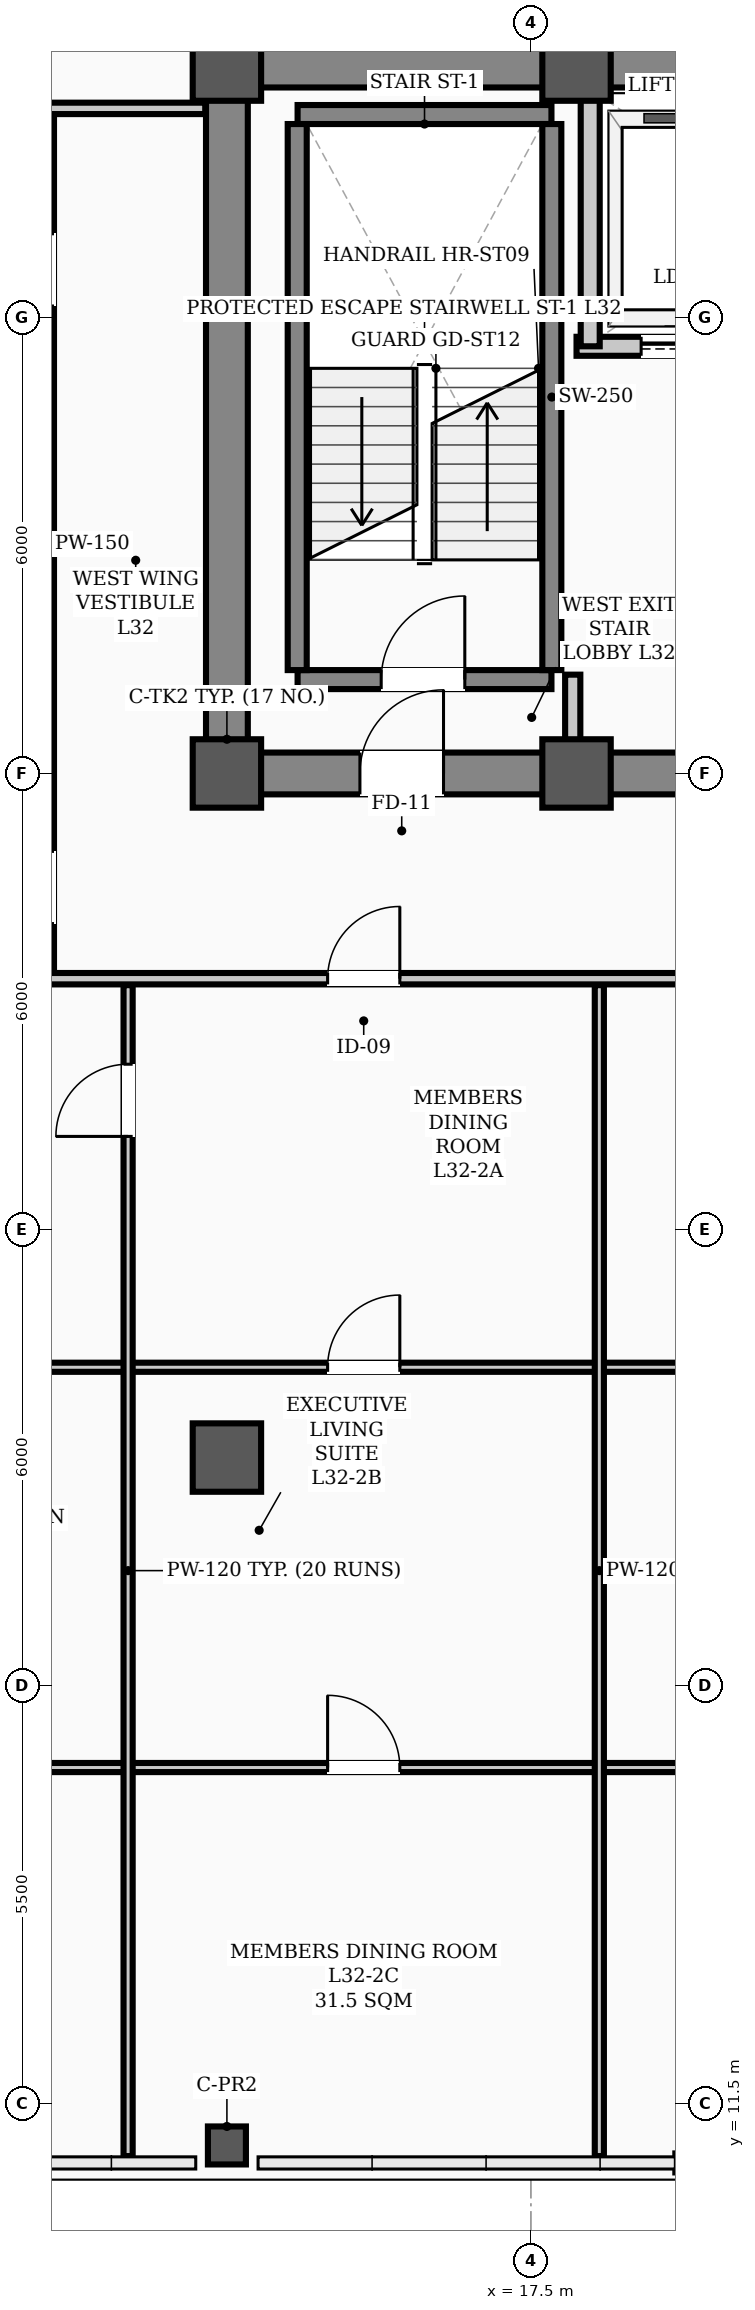
"""IFC4 building model, lengths in metres.
Left out: names, types, materials, properties, quantities, classifications, styles, units other than length and angle.
Written with IfcOpenShell. Run it as: python <this file> out.ifc"""

import sys

from ifc_helpers import new_model, si_unit, direction, frame, frame_2d, origin, origin_2d, place, context, subcontext, project, spatial, rectangle, hollow_rectangle, extrude, element, fill, save


model = new_model("IFC4")
c1 = context("Model", 3, precision=1e-05, world=origin(), true_north=direction((0.0, 1.0)))
c2 = subcontext(c1, "Body", "Model", "MODEL_VIEW")
j1 = project(units=[si_unit("LENGTHUNIT", "METRE"), si_unit("PLANEANGLEUNIT", "RADIAN")], contexts=[c1])
p1 = place(None, origin())
s1 = spatial("IfcSite", under=j1, at=p1, CompositionType="ELEMENT")
p2 = place(p1, origin())
s2 = spatial("IfcBuilding", under=s1, at=p2, CompositionType="ELEMENT")
p3 = place(p2, frame((0.0, 0.0, 130.5)))
s3 = spatial("IfcBuildingStorey", under=s2, at=p3, CompositionType="ELEMENT", Elevation=130.5)
for number, where, z_axis, x_axis in (
    (1, (13.5, 29.0, 0.0), (0.0, 0.0, 1.0), (1.0, 0.0, 0.0)),
    (2, (13.5, 38.3, 0.0), (0.0, 0.0, 1.0), (1.0, 0.0, 0.0)),
    (3, (18.1, 29.0, 0.0), (0.0, 0.0, 1.0), (1.0, 0.0, 0.0)),
    (4, (18.1, 38.3, 0.0), (0.0, 0.0, 1.0), (1.0, 0.0, 0.0)),
    (5, (13.5, 20.0, 0.0), (0.0, 0.0, 1.0), (1.0, 0.0, 0.0)),
):
    element("IfcColumn", number, at=place(p3, frame(where, z_axis=z_axis, x_axis=x_axis)), inside=s3, PredefinedType="COLUMN", context=c2, shape_type="SweptSolid", body=[
        extrude(hollow_rectangle(XDim=0.9, YDim=0.9, WallThickness=0.035, InnerFilletRadius=0.017, OuterFilletRadius=0.052, at=origin_2d()), origin(), (0.0, 0.0, 1.0), 3.9),
    ])
p4 = place(p3, frame((13.5, 10.95, 0.0), z_axis=(0.0, 0.0, 1.0), x_axis=(1.0, 0.0, 0.0)))
e6 = element("IfcColumn", 6, at=p4, inside=s3, PredefinedType="COLUMN", context=c2, shape_type="SweptSolid", body=[
    extrude(hollow_rectangle(XDim=0.5, YDim=0.5, WallThickness=0.024, InnerFilletRadius=0.012, OuterFilletRadius=0.036, at=origin_2d()), origin(), (0.0, 0.0, 1.0), 3.9),
])
p5 = place(p3, frame((13.5, 29.0, 0.0), z_axis=(0.0, 0.0, 1.0), x_axis=(1.0, 0.0, 0.0)))
e7 = element("IfcWall", 7, at=p5, inside=s3, PredefinedType="SHEAR", context=c2, shape_type="SweptSolid", body=[
    extrude(rectangle(XDim=30.5, YDim=0.55, at=frame_2d((15.25, 0.0))), origin(), (0.0, 0.0, 1.0), 3.72),
])
p6 = place(p5, frame((1.75, 0.0, 0.0)))
e8 = element("IfcOpeningElement", 8, at=p6, cuts=e7, PredefinedType="OPENING", context=c2, shape_type="SweptSolid", body=[
    extrude(rectangle(XDim=1.1, YDim=2.08, at=frame_2d((0.55, 1.04))), frame((0.0, 0.285, 0.0), z_axis=(0.0, -1.0, 0.0), x_axis=(1.0, 0.0, 0.0)), (0.0, 0.0, 1.0), 0.57),
])
p7 = place(p5, frame((26.7, 0.0, 0.0)))
e9 = element("IfcOpeningElement", 9, at=p7, cuts=e7, PredefinedType="OPENING", context=c2, shape_type="SweptSolid", body=[
    extrude(rectangle(XDim=1.1, YDim=2.08, at=frame_2d((0.55, 1.04))), frame((0.0, 0.285, 0.0), z_axis=(0.0, -1.0, 0.0), x_axis=(1.0, 0.0, 0.0)), (0.0, 0.0, 1.0), 0.57),
])
p8 = place(p5, frame((6.8, 0.0, 0.0)))
e10 = element("IfcOpeningElement", 10, at=p8, cuts=e7, PredefinedType="OPENING", context=c2, shape_type="SweptSolid", body=[
    extrude(rectangle(XDim=1.1, YDim=2.08, at=frame_2d((0.55, 1.04))), frame((0.0, 0.285, 0.0), z_axis=(0.0, -1.0, 0.0), x_axis=(1.0, 0.0, 0.0)), (0.0, 0.0, 1.0), 0.57),
])
p9 = place(p5, frame((13.2, 0.0, 0.0)))
e11 = element("IfcOpeningElement", 11, at=p9, cuts=e7, PredefinedType="OPENING", context=c2, shape_type="SweptSolid", body=[
    extrude(rectangle(XDim=1.6, YDim=2.08, at=frame_2d((0.8, 1.04))), frame((0.0, 0.285, 0.0), z_axis=(0.0, -1.0, 0.0), x_axis=(1.0, 0.0, 0.0)), (0.0, 0.0, 1.0), 0.57),
])
p10 = place(p5, frame((19.53, 0.0, 0.0)))
e12 = element("IfcOpeningElement", 12, at=p10, cuts=e7, PredefinedType="OPENING", context=c2, shape_type="SweptSolid", body=[
    extrude(rectangle(XDim=0.9, YDim=2.08, at=frame_2d((0.45, 1.04))), frame((0.0, 0.285, 0.0), z_axis=(0.0, -1.0, 0.0), x_axis=(1.0, 0.0, 0.0)), (0.0, 0.0, 1.0), 0.57),
])
p11 = place(p5, frame((21.57, 0.0, 0.0)))
e13 = element("IfcOpeningElement", 13, at=p11, cuts=e7, PredefinedType="OPENING", context=c2, shape_type="SweptSolid", body=[
    extrude(rectangle(XDim=0.9, YDim=2.08, at=frame_2d((0.45, 1.04))), frame((0.0, 0.285, 0.0), z_axis=(0.0, -1.0, 0.0), x_axis=(1.0, 0.0, 0.0)), (0.0, 0.0, 1.0), 0.57),
])
p12 = place(p3, frame((13.5, 38.3, 0.0), z_axis=(0.0, 0.0, 1.0), x_axis=(1.0, 0.0, 0.0)))
e14 = element("IfcWall", 14, at=p12, inside=s3, PredefinedType="SHEAR", context=c2, shape_type="SweptSolid", body=[
    extrude(rectangle(XDim=30.5, YDim=0.55, at=frame_2d((15.25, 0.0))), origin(), (0.0, 0.0, 1.0), 3.72),
])
p13 = place(p3, frame((13.5, 29.35, 0.0), z_axis=(0.0, 0.0, 1.0), x_axis=(0.0, 1.0, 0.0)))
e15 = element("IfcWall", 15, at=p13, inside=s3, PredefinedType="SHEAR", context=c2, shape_type="SweptSolid", body=[
    extrude(rectangle(XDim=8.6, YDim=0.55, at=frame_2d((4.3, 0.0))), origin(), (0.0, 0.0, 1.0), 3.72),
])
p14 = place(p3, frame((14.43, 30.235, 0.0), z_axis=(0.0, 0.0, 1.0), x_axis=(1.0, 0.0, 0.0)))
e16 = element("IfcWall", 16, at=p14, inside=s3, PredefinedType="STANDARD", context=c2, shape_type="SweptSolid", body=[
    extrude(rectangle(XDim=3.34, YDim=0.25, at=frame_2d((1.67, 0.0))), origin(), (0.0, 0.0, 1.0), 3.72),
])
p15 = place(p14, frame((1.1, 0.0, 0.0)))
e17 = element("IfcOpeningElement", 17, at=p15, cuts=e16, PredefinedType="OPENING", context=c2, shape_type="SweptSolid", body=[
    extrude(rectangle(XDim=1.1, YDim=2.08, at=frame_2d((0.55, 1.04))), frame((0.0, 0.135, 0.0), z_axis=(0.0, -1.0, 0.0), x_axis=(1.0, 0.0, 0.0)), (0.0, 0.0, 1.0), 0.27),
])
p16 = place(p3, frame((14.43, 37.669, 0.0), z_axis=(0.0, 0.0, 1.0), x_axis=(1.0, 0.0, 0.0)))
e18 = element("IfcWall", 18, at=p16, inside=s3, PredefinedType="STANDARD", context=c2, shape_type="SweptSolid", body=[
    extrude(rectangle(XDim=3.34, YDim=0.25, at=frame_2d((1.67, 0.0))), origin(), (0.0, 0.0, 1.0), 3.72),
])
for number, where, z_axis, x_axis in (
    (19, (14.425, 30.36, 0.0), (0.0, 0.0, 1.0), (0.0, 1.0, 0.0)),
    (20, (17.775, 30.36, 0.0), (0.0, 0.0, 1.0), (0.0, 1.0, 0.0)),
):
    element("IfcWall", number, at=place(p3, frame(where, z_axis=z_axis, x_axis=x_axis)), inside=s3, PredefinedType="STANDARD", context=c2, shape_type="SweptSolid", body=[
        extrude(rectangle(XDim=7.184, YDim=0.25, at=frame_2d((3.592, 0.0))), origin(), (0.0, 0.0, 1.0), 3.72),
    ])
p17 = place(p3, frame((18.1, 34.62, 0.0), z_axis=(0.0, 0.0, 1.0), x_axis=(1.0, 0.0, 0.0)))
e21 = element("IfcWall", 21, at=p17, inside=s3, PredefinedType="STANDARD", context=c2, shape_type="SweptSolid", body=[
    extrude(rectangle(XDim=5.35, YDim=0.25, at=frame_2d((2.675, 0.0))), origin(), (0.0, 0.0, 1.0), 3.72),
])
p18 = place(p17, frame((0.85, 0.0, 0.0)))
e22 = element("IfcOpeningElement", 22, at=p18, cuts=e21, PredefinedType="OPENING", context=c2, shape_type="SweptSolid", body=[
    extrude(rectangle(XDim=1.1, YDim=2.08, at=frame_2d((0.55, 1.04))), frame((0.0, 0.135, 0.0), z_axis=(0.0, -1.0, 0.0), x_axis=(1.0, 0.0, 0.0)), (0.0, 0.0, 1.0), 0.27),
])
p19 = place(p17, frame((3.45, 0.0, 0.0)))
e23 = element("IfcOpeningElement", 23, at=p19, cuts=e21, PredefinedType="OPENING", context=c2, shape_type="SweptSolid", body=[
    extrude(rectangle(XDim=1.1, YDim=2.08, at=frame_2d((0.55, 1.04))), frame((0.0, 0.135, 0.0), z_axis=(0.0, -1.0, 0.0), x_axis=(1.0, 0.0, 0.0)), (0.0, 0.0, 1.0), 0.27),
])
p20 = place(p3, frame((18.28, 34.62, 0.0), z_axis=(0.0, 0.0, 1.0), x_axis=(0.0, 1.0, 0.0)))
e24 = element("IfcWall", 24, at=p20, inside=s3, PredefinedType="STANDARD", context=c2, shape_type="SweptSolid", body=[
    extrude(rectangle(XDim=3.33, YDim=0.25, at=frame_2d((1.665, 0.0))), origin(), (0.0, 0.0, 1.0), 3.72),
])
p21 = place(p3, frame((2.31, 26.3, 0.0), z_axis=(0.0, 0.0, 1.0), x_axis=(1.0, 0.0, 0.0)))
e25 = element("IfcWall", 25, at=p21, inside=s3, PredefinedType="PARTITIONING", context=c2, shape_type="SweptSolid", body=[
    extrude(rectangle(XDim=46.38, YDim=0.15, at=frame_2d((23.19, 0.0))), origin(), (0.0, 0.0, 1.0), 3.1),
])
p22 = place(p21, frame((12.515, 0.0, 0.0)))
e26 = element("IfcOpeningElement", 26, at=p22, cuts=e25, PredefinedType="OPENING", context=c2, shape_type="SweptSolid", body=[
    extrude(rectangle(XDim=0.95, YDim=2.08, at=frame_2d((0.475, 1.04))), frame((0.0, 0.085, 0.0), z_axis=(0.0, -1.0, 0.0), x_axis=(1.0, 0.0, 0.0)), (0.0, 0.0, 1.0), 0.17),
])
p23 = place(p21, frame((18.615, 0.0, 0.0)))
e27 = element("IfcOpeningElement", 27, at=p23, cuts=e25, PredefinedType="OPENING", context=c2, shape_type="SweptSolid", body=[
    extrude(rectangle(XDim=0.95, YDim=2.08, at=frame_2d((0.475, 1.04))), frame((0.0, 0.085, 0.0), z_axis=(0.0, -1.0, 0.0), x_axis=(1.0, 0.0, 0.0)), (0.0, 0.0, 1.0), 0.17),
])
p24 = place(p21, frame((26.115, 0.0, 0.0)))
e28 = element("IfcOpeningElement", 28, at=p24, cuts=e25, PredefinedType="OPENING", context=c2, shape_type="SweptSolid", body=[
    extrude(rectangle(XDim=0.95, YDim=2.08, at=frame_2d((0.475, 1.04))), frame((0.0, 0.085, 0.0), z_axis=(0.0, -1.0, 0.0), x_axis=(1.0, 0.0, 0.0)), (0.0, 0.0, 1.0), 0.17),
])
p25 = place(p21, frame((31.665, 0.0, 0.0)))
e29 = element("IfcOpeningElement", 29, at=p25, cuts=e25, PredefinedType="OPENING", context=c2, shape_type="SweptSolid", body=[
    extrude(rectangle(XDim=0.95, YDim=2.08, at=frame_2d((0.475, 1.04))), frame((0.0, 0.085, 0.0), z_axis=(0.0, -1.0, 0.0), x_axis=(1.0, 0.0, 0.0)), (0.0, 0.0, 1.0), 0.17),
])
p26 = place(p21, frame((43.06, 0.0, 0.0)))
e30 = element("IfcOpeningElement", 30, at=p26, cuts=e25, PredefinedType="OPENING", context=c2, shape_type="SweptSolid", body=[
    extrude(rectangle(XDim=0.95, YDim=2.08, at=frame_2d((0.475, 1.04))), frame((0.0, 0.085, 0.0), z_axis=(0.0, -1.0, 0.0), x_axis=(1.0, 0.0, 0.0)), (0.0, 0.0, 1.0), 0.17),
])
p27 = place(p3, frame((2.31, 37.75, 0.0), z_axis=(0.0, 0.0, 1.0), x_axis=(1.0, 0.0, 0.0)))
e31 = element("IfcWall", 31, at=p27, inside=s3, PredefinedType="PARTITIONING", context=c2, shape_type="SweptSolid", body=[
    extrude(rectangle(XDim=10.905, YDim=0.15, at=frame_2d((5.453, 0.0))), origin(), (0.0, 0.0, 1.0), 3.1),
])
p28 = place(p3, frame((2.31, 21.188, 0.0), z_axis=(0.0, 0.0, 1.0), x_axis=(1.0, 0.0, 0.0)))
e32 = element("IfcWall", 32, at=p28, inside=s3, PredefinedType="PARTITIONING", context=c2, shape_type="SweptSolid", body=[
    extrude(rectangle(XDim=9.89, YDim=0.12, at=frame_2d((4.945, 0.0))), origin(), (0.0, 0.0, 1.0), 3.212),
])
p29 = place(p28, frame((4.47, 0.0, 0.0)))
e33 = element("IfcOpeningElement", 33, at=p29, cuts=e32, PredefinedType="OPENING", context=c2, shape_type="SweptSolid", body=[
    extrude(rectangle(XDim=0.95, YDim=2.08, at=frame_2d((0.475, 1.04))), frame((0.0, 0.07, 0.0), z_axis=(0.0, -1.0, 0.0), x_axis=(1.0, 0.0, 0.0)), (0.0, 0.0, 1.0), 0.14),
])
p30 = place(p3, frame((2.31, 15.922, 0.0), z_axis=(0.0, 0.0, 1.0), x_axis=(1.0, 0.0, 0.0)))
e34 = element("IfcWall", 34, at=p30, inside=s3, PredefinedType="PARTITIONING", context=c2, shape_type="SweptSolid", body=[
    extrude(rectangle(XDim=9.89, YDim=0.12, at=frame_2d((4.945, 0.0))), origin(), (0.0, 0.0, 1.0), 3.72),
])
p31 = place(p30, frame((4.47, 0.0, 0.0)))
e35 = element("IfcOpeningElement", 35, at=p31, cuts=e34, PredefinedType="OPENING", context=c2, shape_type="SweptSolid", body=[
    extrude(rectangle(XDim=0.95, YDim=2.08, at=frame_2d((0.475, 1.04))), frame((0.0, 0.07, 0.0), z_axis=(0.0, -1.0, 0.0), x_axis=(1.0, 0.0, 0.0)), (0.0, 0.0, 1.0), 0.14),
])
p32 = place(p3, frame((12.2, 21.188, 0.0), z_axis=(0.0, 0.0, 1.0), x_axis=(1.0, 0.0, 0.0)))
e36 = element("IfcWall", 36, at=p32, inside=s3, PredefinedType="PARTITIONING", context=c2, shape_type="SweptSolid", body=[
    extrude(rectangle(XDim=6.2, YDim=0.12, at=frame_2d((3.1, 0.0))), origin(), (0.0, 0.0, 1.0), 3.1),
])
p33 = place(p32, frame((2.625, 0.0, 0.0)))
e37 = element("IfcOpeningElement", 37, at=p33, cuts=e36, PredefinedType="OPENING", context=c2, shape_type="SweptSolid", body=[
    extrude(rectangle(XDim=0.95, YDim=2.08, at=frame_2d((0.475, 1.04))), frame((0.0, 0.07, 0.0), z_axis=(0.0, -1.0, 0.0), x_axis=(1.0, 0.0, 0.0)), (0.0, 0.0, 1.0), 0.14),
])
p34 = place(p3, frame((12.2, 15.922, 0.0), z_axis=(0.0, 0.0, 1.0), x_axis=(1.0, 0.0, 0.0)))
e38 = element("IfcWall", 38, at=p34, inside=s3, PredefinedType="PARTITIONING", context=c2, shape_type="SweptSolid", body=[
    extrude(rectangle(XDim=6.2, YDim=0.12, at=frame_2d((3.1, 0.0))), origin(), (0.0, 0.0, 1.0), 3.1),
])
p35 = place(p34, frame((2.625, 0.0, 0.0)))
e39 = element("IfcOpeningElement", 39, at=p35, cuts=e38, PredefinedType="OPENING", context=c2, shape_type="SweptSolid", body=[
    extrude(rectangle(XDim=0.95, YDim=2.08, at=frame_2d((0.475, 1.04))), frame((0.0, 0.07, 0.0), z_axis=(0.0, -1.0, 0.0), x_axis=(1.0, 0.0, 0.0)), (0.0, 0.0, 1.0), 0.14),
])
p36 = place(p3, frame((18.4, 21.188, 0.0), z_axis=(0.0, 0.0, 1.0), x_axis=(1.0, 0.0, 0.0)))
e40 = element("IfcWall", 40, at=p36, inside=s3, PredefinedType="PARTITIONING", context=c2, shape_type="SweptSolid", body=[
    extrude(rectangle(XDim=6.0, YDim=0.12, at=frame_2d((3.0, 0.0))), origin(), (0.0, 0.0, 1.0), 3.1),
])
p37 = place(p36, frame((2.525, 0.0, 0.0)))
e41 = element("IfcOpeningElement", 41, at=p37, cuts=e40, PredefinedType="OPENING", context=c2, shape_type="SweptSolid", body=[
    extrude(rectangle(XDim=0.95, YDim=2.08, at=frame_2d((0.475, 1.04))), frame((0.0, 0.07, 0.0), z_axis=(0.0, -1.0, 0.0), x_axis=(1.0, 0.0, 0.0)), (0.0, 0.0, 1.0), 0.14),
])
p38 = place(p3, frame((18.4, 15.922, 0.0), z_axis=(0.0, 0.0, 1.0), x_axis=(1.0, 0.0, 0.0)))
e42 = element("IfcWall", 42, at=p38, inside=s3, PredefinedType="PARTITIONING", context=c2, shape_type="SweptSolid", body=[
    extrude(rectangle(XDim=6.0, YDim=0.12, at=frame_2d((3.0, 0.0))), origin(), (0.0, 0.0, 1.0), 3.1),
])
p39 = place(p38, frame((2.525, 0.0, 0.0)))
e43 = element("IfcOpeningElement", 43, at=p39, cuts=e42, PredefinedType="OPENING", context=c2, shape_type="SweptSolid", body=[
    extrude(rectangle(XDim=0.95, YDim=2.08, at=frame_2d((0.475, 1.04))), frame((0.0, 0.07, 0.0), z_axis=(0.0, -1.0, 0.0), x_axis=(1.0, 0.0, 0.0)), (0.0, 0.0, 1.0), 0.14),
])
p40 = place(p3, frame((18.05, 29.285, 0.0), z_axis=(0.0, 0.0, 1.0), x_axis=(0.0, 1.0, 0.0)))
e44 = element("IfcWall", 44, at=p40, inside=s3, PredefinedType="STANDARD", context=c2, shape_type="SweptSolid", body=[
    extrude(rectangle(XDim=1.015, YDim=0.2, at=frame_2d((0.508, 0.0))), origin(), (0.0, 0.0, 1.0), 3.3),
])
p41 = place(p3, frame((11.15, 26.385, 0.0), z_axis=(0.0, 0.0, 1.0), x_axis=(0.0, 1.0, 0.0)))
e45 = element("IfcWall", 45, at=p41, inside=s3, PredefinedType="PARTITIONING", context=c2, shape_type="SweptSolid", body=[
    extrude(rectangle(XDim=11.28, YDim=0.15, at=frame_2d((5.64, 0.0))), origin(), (0.0, 0.0, 1.0), 3.0),
])
p42 = place(p41, frame((0.64, 0.0, 0.0)))
e46 = element("IfcOpeningElement", 46, at=p42, cuts=e45, PredefinedType="OPENING", context=c2, shape_type="SweptSolid", body=[
    extrude(rectangle(XDim=0.95, YDim=2.08, at=frame_2d((0.475, 1.04))), frame((0.0, 0.085, 0.0), z_axis=(0.0, -1.0, 0.0), x_axis=(1.0, 0.0, 0.0)), (0.0, 0.0, 1.0), 0.17),
])
p43 = place(p41, frame((8.765, 0.0, 0.0)))
e47 = element("IfcOpeningElement", 47, at=p43, cuts=e45, PredefinedType="OPENING", context=c2, shape_type="SweptSolid", body=[
    extrude(rectangle(XDim=0.95, YDim=2.08, at=frame_2d((0.475, 1.04))), frame((0.0, 0.085, 0.0), z_axis=(0.0, -1.0, 0.0), x_axis=(1.0, 0.0, 0.0)), (0.0, 0.0, 1.0), 0.17),
])
p44 = place(p3, frame((12.2, 10.81, 0.0), z_axis=(0.0, 0.0, 1.0), x_axis=(0.0, 1.0, 0.0)))
e48 = element("IfcWall", 48, at=p44, inside=s3, PredefinedType="PARTITIONING", context=c2, shape_type="SweptSolid", body=[
    extrude(rectangle(XDim=15.405, YDim=0.12, at=frame_2d((7.703, 0.0))), origin(), (0.0, 0.0, 1.0), 3.0),
])
p45 = place(p44, frame((13.415, 0.0, 0.0)))
e49 = element("IfcOpeningElement", 49, at=p45, cuts=e48, PredefinedType="OPENING", context=c2, shape_type="SweptSolid", body=[
    extrude(rectangle(XDim=0.95, YDim=2.08, at=frame_2d((0.475, 1.04))), frame((0.0, 0.07, 0.0), z_axis=(0.0, -1.0, 0.0), x_axis=(1.0, 0.0, 0.0)), (0.0, 0.0, 1.0), 0.14),
])
p46 = place(p3, frame((18.4, 10.81, 0.0), z_axis=(0.0, 0.0, 1.0), x_axis=(0.0, 1.0, 0.0)))
e50 = element("IfcWall", 50, at=p46, inside=s3, PredefinedType="PARTITIONING", context=c2, shape_type="SweptSolid", body=[
    extrude(rectangle(XDim=15.405, YDim=0.12, at=frame_2d((7.703, 0.0))), origin(), (0.0, 0.0, 1.0), 3.0),
])
p47 = place(p15, origin())
e51 = element("IfcDoor", 51, at=p47, inside=s3, OperationType="SINGLE_SWING_RIGHT", PredefinedType="DOOR", context=c2, shape_type="SweptSolid", body=[
    extrude(rectangle(XDim=1.1, YDim=2.08, at=frame_2d((0.55, 1.04))), frame((0.0, 0.025, 0.0), z_axis=(0.0, -1.0, 0.0), x_axis=(1.0, 0.0, 0.0)), (0.0, 0.0, 1.0), 0.05),
])
fill(e17, e51)
p48 = place(p6, origin())
e52 = element("IfcDoor", 52, at=p48, inside=s3, OperationType="SINGLE_SWING_RIGHT", PredefinedType="DOOR", context=c2, shape_type="SweptSolid", body=[
    extrude(rectangle(XDim=1.1, YDim=2.08, at=frame_2d((0.55, 1.04))), frame((0.0, 0.025, 0.0), z_axis=(0.0, -1.0, 0.0), x_axis=(1.0, 0.0, 0.0)), (0.0, 0.0, 1.0), 0.05),
])
fill(e8, e52)
p49 = place(p45, origin())
e53 = element("IfcDoor", 53, at=p49, inside=s3, OperationType="SINGLE_SWING_LEFT", PredefinedType="DOOR", context=c2, shape_type="SweptSolid", body=[
    extrude(rectangle(XDim=0.95, YDim=2.08, at=frame_2d((0.475, 1.04))), frame((0.0, 0.025, 0.0), z_axis=(0.0, -1.0, 0.0), x_axis=(1.0, 0.0, 0.0)), (0.0, 0.0, 1.0), 0.05),
])
fill(e49, e53)
p50 = place(p33, origin())
e54 = element("IfcDoor", 54, at=p50, inside=s3, OperationType="SINGLE_SWING_RIGHT", PredefinedType="DOOR", context=c2, shape_type="SweptSolid", body=[
    extrude(rectangle(XDim=0.95, YDim=2.08, at=frame_2d((0.475, 1.04))), frame((0.0, 0.025, 0.0), z_axis=(0.0, -1.0, 0.0), x_axis=(1.0, 0.0, 0.0)), (0.0, 0.0, 1.0), 0.05),
])
fill(e37, e54)
p51 = place(p35, origin())
e55 = element("IfcDoor", 55, at=p51, inside=s3, OperationType="SINGLE_SWING_LEFT", PredefinedType="DOOR", context=c2, shape_type="SweptSolid", body=[
    extrude(rectangle(XDim=0.95, YDim=2.08, at=frame_2d((0.475, 1.04))), frame((0.0, 0.025, 0.0), z_axis=(0.0, -1.0, 0.0), x_axis=(1.0, 0.0, 0.0)), (0.0, 0.0, 1.0), 0.05),
])
fill(e39, e55)
p52 = place(p22, origin())
e56 = element("IfcDoor", 56, at=p52, inside=s3, OperationType="SINGLE_SWING_RIGHT", PredefinedType="DOOR", context=c2, shape_type="SweptSolid", body=[
    extrude(rectangle(XDim=0.95, YDim=2.08, at=frame_2d((0.475, 1.04))), frame((0.0, 0.025, 0.0), z_axis=(0.0, -1.0, 0.0), x_axis=(1.0, 0.0, 0.0)), (0.0, 0.0, 1.0), 0.05),
])
fill(e26, e56)
p53 = place(p18, origin())
e57 = element("IfcDoor", 57, at=p53, inside=s3, OperationType="SLIDING_TO_LEFT", PredefinedType="DOOR", context=c2, shape_type="SweptSolid", body=[
    extrude(rectangle(XDim=1.1, YDim=2.08, at=frame_2d((0.55, 1.04))), frame((0.0, 0.025, 0.0), z_axis=(0.0, -1.0, 0.0), x_axis=(1.0, 0.0, 0.0)), (0.0, 0.0, 1.0), 0.05),
])
fill(e22, e57)
save(model, sys.argv[1])
